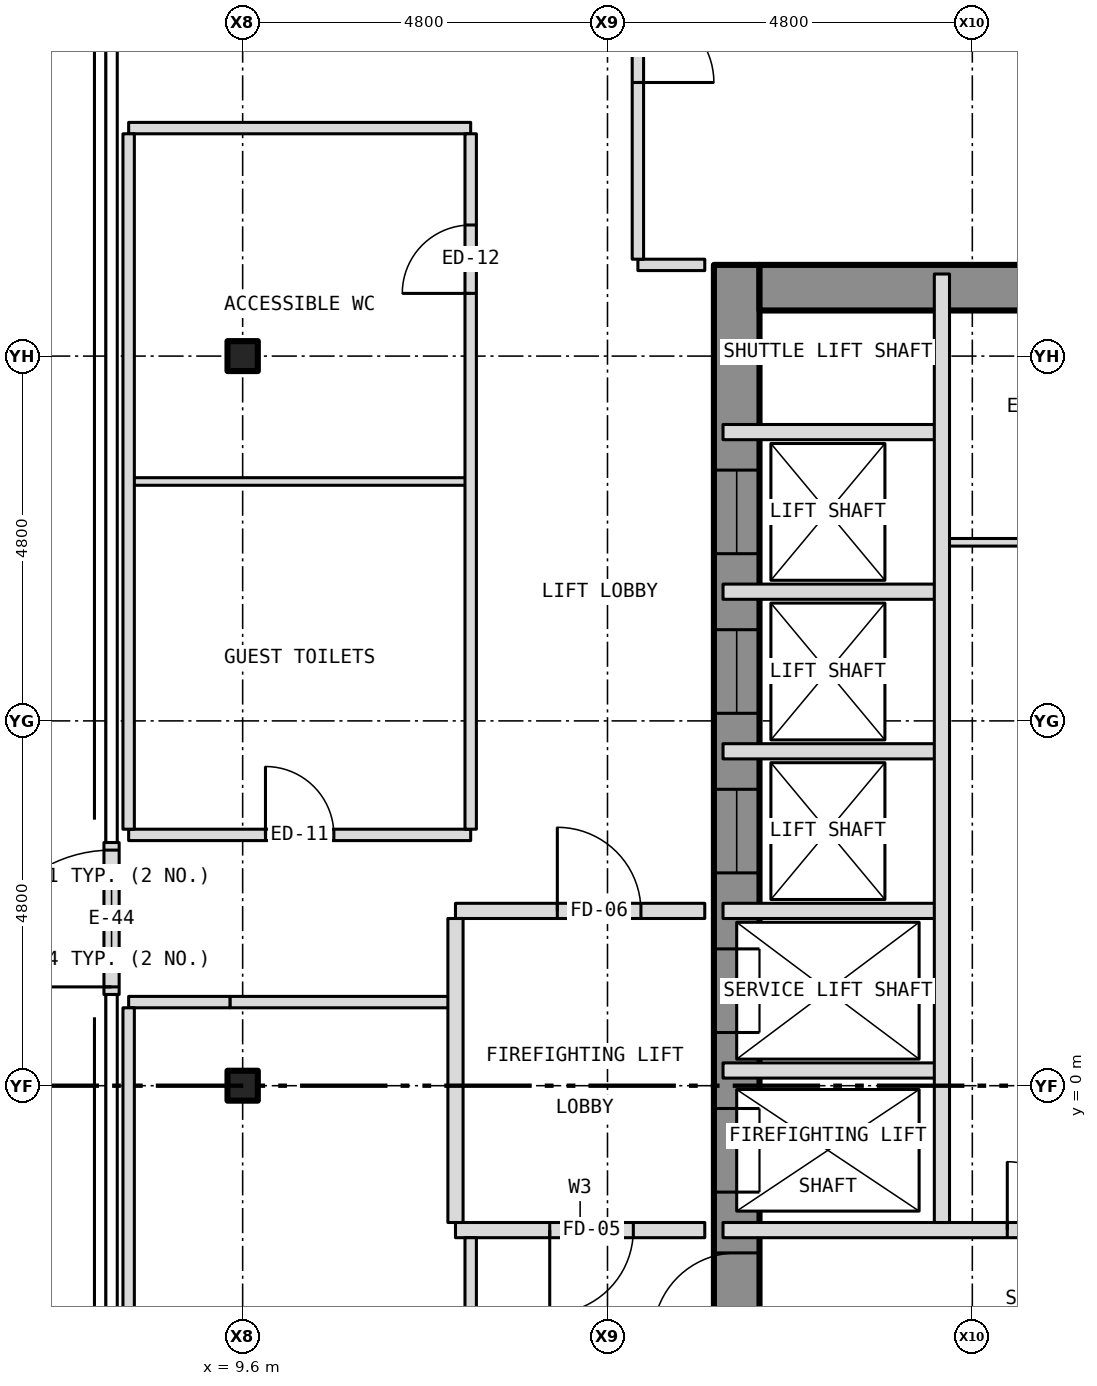
"""IFC4 building model, lengths in metres.
Left out: names, types, materials, properties, quantities, classifications, styles, units other than length and angle.
Written with IfcOpenShell. Run it as: python <this file> out.ifc"""

import sys

from ifc_helpers import new_model, si_unit, direction, frame, frame_2d, origin, origin_2d, place, context, subcontext, project, spatial, rectangle, i_section, extrude, element, fill, save


model = new_model("IFC4")
c1 = context("Model", 3, precision=1e-05, world=origin(), true_north=direction((0.0, 1.0)))
c2 = subcontext(c1, "Body", "Model", "MODEL_VIEW")
j1 = project(units=[si_unit("LENGTHUNIT", "METRE"), si_unit("PLANEANGLEUNIT", "RADIAN")], contexts=[c1])
p1 = place(None, origin())
s1 = spatial("IfcSite", under=j1, at=p1, CompositionType="ELEMENT")
p2 = place(p1, origin())
s2 = spatial("IfcBuilding", under=s1, at=p2, CompositionType="ELEMENT")
p3 = place(p2, frame((0.0, 0.0, 117.0)))
s3 = spatial("IfcBuildingStorey", under=s2, at=p3, CompositionType="ELEMENT", Elevation=117.0)
for number, where, z_axis, x_axis in (
    (1, (9.6, 0.0, -0.15), (0.0, 0.0, 1.0), (1.0, 0.0, 0.0)),
    (2, (9.6, 9.6, -0.15), (0.0, 0.0, 1.0), (1.0, 0.0, 0.0)),
):
    element("IfcColumn", number, at=place(p3, frame(where, z_axis=z_axis, x_axis=x_axis)), inside=s3, PredefinedType="COLUMN", context=c2, shape_type="SweptSolid", body=[
        extrude(i_section(OverallWidth=0.399, OverallDepth=0.394, WebThickness=0.023, FlangeThickness=0.037, at=origin_2d()), origin(), (0.0, 0.0, 1.0), 3.5),
    ])
p4 = place(p3, frame((16.1, -10.8, 0.0), z_axis=(0.0, 0.0, 1.0), x_axis=(0.0, 1.0, 0.0)))
e3 = element("IfcWall", 3, at=p4, inside=s3, PredefinedType="SHEAR", context=c2, shape_type="SweptSolid", body=[
    extrude(rectangle(XDim=21.6, YDim=0.6, at=frame_2d((10.8, 0.0))), origin(), (0.0, 0.0, 1.0), 3.25),
])
p5 = place(p4, frame((9.4, 0.0, 0.0)))
e4 = element("IfcOpeningElement", 4, at=p5, cuts=e3, PredefinedType="OPENING", context=c2, shape_type="SweptSolid", body=[
    extrude(rectangle(XDim=1.1, YDim=2.1, at=frame_2d((0.55, 1.05))), frame((0.0, 0.312, 0.0), z_axis=(0.0, -1.0, 0.0), x_axis=(1.0, 0.0, 0.0)), (0.0, 0.0, 1.0), 0.624),
])
p6 = place(p4, frame((11.5, 0.0, 0.0)))
e5 = element("IfcOpeningElement", 5, at=p6, cuts=e3, PredefinedType="OPENING", context=c2, shape_type="SweptSolid", body=[
    extrude(rectangle(XDim=1.1, YDim=2.1, at=frame_2d((0.55, 1.05))), frame((0.0, 0.312, 0.0), z_axis=(0.0, -1.0, 0.0), x_axis=(1.0, 0.0, 0.0)), (0.0, 0.0, 1.0), 0.624),
])
p7 = place(p4, frame((13.6, 0.0, 0.0)))
e6 = element("IfcOpeningElement", 6, at=p7, cuts=e3, PredefinedType="OPENING", context=c2, shape_type="SweptSolid", body=[
    extrude(rectangle(XDim=1.1, YDim=2.1, at=frame_2d((0.55, 1.05))), frame((0.0, 0.312, 0.0), z_axis=(0.0, -1.0, 0.0), x_axis=(1.0, 0.0, 0.0)), (0.0, 0.0, 1.0), 0.624),
])
p8 = place(p4, frame((15.7, 0.0, 0.0)))
e7 = element("IfcOpeningElement", 7, at=p8, cuts=e3, PredefinedType="OPENING", context=c2, shape_type="SweptSolid", body=[
    extrude(rectangle(XDim=1.1, YDim=2.1, at=frame_2d((0.55, 1.05))), frame((0.0, 0.312, 0.0), z_axis=(0.0, -1.0, 0.0), x_axis=(1.0, 0.0, 0.0)), (0.0, 0.0, 1.0), 0.624),
])
p9 = place(p4, frame((17.8, 0.0, 0.0)))
e8 = element("IfcOpeningElement", 8, at=p9, cuts=e3, PredefinedType="OPENING", context=c2, shape_type="SweptSolid", body=[
    extrude(rectangle(XDim=1.1, YDim=2.1, at=frame_2d((0.55, 1.05))), frame((0.0, 0.312, 0.0), z_axis=(0.0, -1.0, 0.0), x_axis=(1.0, 0.0, 0.0)), (0.0, 0.0, 1.0), 0.624),
])
p10 = place(p4, frame((5.642, 0.0, 0.0)))
e9 = element("IfcOpeningElement", 9, at=p10, cuts=e3, PredefinedType="OPENING", context=c2, shape_type="SweptSolid", body=[
    extrude(rectangle(XDim=1.1, YDim=2.1, at=frame_2d((0.55, 1.05))), frame((0.0, 0.312, 0.0), z_axis=(0.0, -1.0, 0.0), x_axis=(1.0, 0.0, 0.0)), (0.0, 0.0, 1.0), 0.624),
])
p11 = place(p4, frame((7.5, 0.0, 0.0)))
e10 = element("IfcOpeningElement", 10, at=p11, cuts=e3, PredefinedType="OPENING", context=c2, shape_type="SweptSolid", body=[
    extrude(rectangle(XDim=1.1, YDim=2.1, at=frame_2d((0.55, 1.05))), frame((0.0, 0.312, 0.0), z_axis=(0.0, -1.0, 0.0), x_axis=(1.0, 0.0, 0.0)), (0.0, 0.0, 1.0), 0.624),
])
p12 = place(p3, frame((16.4, 10.5, 0.0), z_axis=(0.0, 0.0, 1.0), x_axis=(1.0, 0.0, 0.0)))
e11 = element("IfcWall", 11, at=p12, inside=s3, PredefinedType="SHEAR", context=c2, shape_type="SweptSolid", body=[
    extrude(rectangle(XDim=5.8, YDim=0.6, at=frame_2d((2.9, 0.0))), origin(), (0.0, 0.0, 1.0), 3.25),
])
p13 = place(p3, frame((7.875, 1.2, 0.0), z_axis=(0.0, 0.0, 1.0), x_axis=(0.0, 1.0, 0.0)))
e12 = element("IfcWall", 12, at=p13, inside=s3, PredefinedType="SOLIDWALL", context=c2, shape_type="SweptSolid", body=[
    extrude(rectangle(XDim=2.0, YDim=0.2, at=frame_2d((1.0, 0.0))), origin(), (0.0, 0.0, 1.0), 2.593),
])
p14 = place(p13, frame((0.1, 0.0, 0.0)))
e13 = element("IfcOpeningElement", 13, at=p14, cuts=e12, PredefinedType="OPENING", context=c2, shape_type="SweptSolid", body=[
    extrude(rectangle(XDim=1.8, YDim=2.1, at=frame_2d((0.9, 1.05))), frame((0.0, 0.112, 0.0), z_axis=(0.0, -1.0, 0.0), x_axis=(1.0, 0.0, 0.0)), (0.0, 0.0, 1.0), 0.224),
])
p15 = place(p3, frame((12.4, -1.9, 0.0), z_axis=(0.0, 0.0, 1.0), x_axis=(1.0, 0.0, 0.0)))
e14 = element("IfcWall", 14, at=p15, inside=s3, PredefinedType="PARTITIONING", context=c2, shape_type="SweptSolid", body=[
    extrude(rectangle(XDim=3.28, YDim=0.2, at=frame_2d((1.64, 0.0))), origin(), (0.0, 0.0, 1.0), 3.35),
])
p16 = place(p15, frame((1.24, 0.0, 0.0)))
e15 = element("IfcOpeningElement", 15, at=p16, cuts=e14, PredefinedType="OPENING", context=c2, shape_type="SweptSolid", body=[
    extrude(rectangle(XDim=1.1, YDim=2.1, at=frame_2d((0.55, 1.05))), frame((0.0, 0.112, 0.0), z_axis=(0.0, -1.0, 0.0), x_axis=(1.0, 0.0, 0.0)), (0.0, 0.0, 1.0), 0.224),
])
p17 = place(p3, frame((15.92, -1.9, 0.0), z_axis=(0.0, 0.0, 1.0), x_axis=(1.0, 0.0, 0.0)))
e16 = element("IfcWall", 16, at=p17, inside=s3, PredefinedType="PARTITIONING", context=c2, shape_type="SweptSolid", body=[
    extrude(rectangle(XDim=6.76, YDim=0.2, at=frame_2d((3.38, 0.0))), origin(), (0.0, 0.0, 1.0), 3.25),
])
p18 = place(p17, frame((3.74, 0.0, 0.0)))
e17 = element("IfcOpeningElement", 17, at=p18, cuts=e16, PredefinedType="OPENING", context=c2, shape_type="SweptSolid", body=[
    extrude(rectangle(XDim=0.9, YDim=2.1, at=frame_2d((0.45, 1.05))), frame((0.0, 0.112, 0.0), z_axis=(0.0, -1.0, 0.0), x_axis=(1.0, 0.0, 0.0)), (0.0, 0.0, 1.0), 0.224),
])
p19 = place(p3, frame((15.92, 0.2, 0.0), z_axis=(0.0, 0.0, 1.0), x_axis=(1.0, 0.0, 0.0)))
e18 = element("IfcWall", 18, at=p19, inside=s3, PredefinedType="PARTITIONING", context=c2, shape_type="SweptSolid", body=[
    extrude(rectangle(XDim=2.88, YDim=0.2, at=frame_2d((1.44, 0.0))), origin(), (0.0, 0.0, 1.0), 3.25),
])
p20 = place(p3, frame((8.1, 1.1, 0.0), z_axis=(0.0, 0.0, 1.0), x_axis=(1.0, 0.0, 0.0)))
e19 = element("IfcWall", 19, at=p20, inside=s3, PredefinedType="PARTITIONING", context=c2, shape_type="SweptSolid", body=[
    extrude(rectangle(XDim=1.336, YDim=0.15, at=frame_2d((0.668, 0.0))), origin(), (0.0, 0.0, 1.0), 2.593),
])
p21 = place(p3, frame((9.436, 1.1, 0.0), z_axis=(0.0, 0.0, 1.0), x_axis=(1.0, 0.0, 0.0)))
e20 = element("IfcWall", 20, at=p21, inside=s3, PredefinedType="PARTITIONING", context=c2, shape_type="SweptSolid", body=[
    extrude(rectangle(XDim=2.964, YDim=0.15, at=frame_2d((1.482, 0.0))), origin(), (0.0, 0.0, 1.0), 3.35),
])
p22 = place(p3, frame((12.4, 2.3, 0.0), z_axis=(0.0, 0.0, 1.0), x_axis=(1.0, 0.0, 0.0)))
e21 = element("IfcWall", 21, at=p22, inside=s3, PredefinedType="PARTITIONING", context=c2, shape_type="SweptSolid", body=[
    extrude(rectangle(XDim=3.28, YDim=0.2, at=frame_2d((1.64, 0.0))), origin(), (0.0, 0.0, 1.0), 3.35),
])
p23 = place(p22, frame((1.34, 0.0, 0.0)))
e22 = element("IfcOpeningElement", 22, at=p23, cuts=e21, PredefinedType="OPENING", context=c2, shape_type="SweptSolid", body=[
    extrude(rectangle(XDim=1.1, YDim=2.1, at=frame_2d((0.55, 1.05))), frame((0.0, 0.112, 0.0), z_axis=(0.0, -1.0, 0.0), x_axis=(1.0, 0.0, 0.0)), (0.0, 0.0, 1.0), 0.224),
])
p24 = place(p3, frame((15.92, 2.3, 0.0), z_axis=(0.0, 0.0, 1.0), x_axis=(1.0, 0.0, 0.0)))
e23 = element("IfcWall", 23, at=p24, inside=s3, PredefinedType="PARTITIONING", context=c2, shape_type="SweptSolid", body=[
    extrude(rectangle(XDim=2.88, YDim=0.2, at=frame_2d((1.44, 0.0))), origin(), (0.0, 0.0, 1.0), 3.25),
])
p25 = place(p3, frame((8.1, 3.3, 0.0), z_axis=(0.0, 0.0, 1.0), x_axis=(1.0, 0.0, 0.0)))
e24 = element("IfcWall", 24, at=p25, inside=s3, PredefinedType="PARTITIONING", context=c2, shape_type="SweptSolid", body=[
    extrude(rectangle(XDim=4.5, YDim=0.15, at=frame_2d((2.25, 0.0))), origin(), (0.0, 0.0, 1.0), 3.35),
])
p26 = place(p25, frame((1.8, 0.0, 0.0)))
e25 = element("IfcOpeningElement", 25, at=p26, cuts=e24, PredefinedType="OPENING", context=c2, shape_type="SweptSolid", body=[
    extrude(rectangle(XDim=0.9, YDim=2.1, at=frame_2d((0.45, 1.05))), frame((0.0, 0.087, 0.0), z_axis=(0.0, -1.0, 0.0), x_axis=(1.0, 0.0, 0.0)), (0.0, 0.0, 1.0), 0.174),
])
for number, where, z_axis, x_axis in (
    (26, (15.92, 4.4, 0.0), (0.0, 0.0, 1.0), (1.0, 0.0, 0.0)),
    (27, (15.92, 6.5, 0.0), (0.0, 0.0, 1.0), (1.0, 0.0, 0.0)),
):
    element("IfcWall", number, at=place(p3, frame(where, z_axis=z_axis, x_axis=x_axis)), inside=s3, PredefinedType="PARTITIONING", context=c2, shape_type="SweptSolid", body=[
        extrude(rectangle(XDim=2.88, YDim=0.2, at=frame_2d((1.44, 0.0))), origin(), (0.0, 0.0, 1.0), 3.25),
    ])
p27 = place(p3, frame((18.8, 7.15, 0.0), z_axis=(0.0, 0.0, 1.0), x_axis=(1.0, 0.0, 0.0)))
e28 = element("IfcWall", 28, at=p27, inside=s3, PredefinedType="PARTITIONING", context=c2, shape_type="SweptSolid", body=[
    extrude(rectangle(XDim=3.88, YDim=0.1, at=frame_2d((1.94, 0.0))), origin(), (0.0, 0.0, 1.0), 3.25),
])
p28 = place(p27, frame((1.55, 0.0, 0.0)))
e29 = element("IfcOpeningElement", 29, at=p28, cuts=e28, PredefinedType="OPENING", context=c2, shape_type="SweptSolid", body=[
    extrude(rectangle(XDim=0.9, YDim=2.1, at=frame_2d((0.45, 1.05))), frame((0.0, 0.062, 0.0), z_axis=(0.0, -1.0, 0.0), x_axis=(1.0, 0.0, 0.0)), (0.0, 0.0, 1.0), 0.124),
])
p29 = place(p3, frame((8.1, 7.95, 0.0), z_axis=(0.0, 0.0, 1.0), x_axis=(1.0, 0.0, 0.0)))
e30 = element("IfcWall", 30, at=p29, inside=s3, PredefinedType="PARTITIONING", context=c2, shape_type="SweptSolid", body=[
    extrude(rectangle(XDim=4.5, YDim=0.1, at=frame_2d((2.25, 0.0))), origin(), (0.0, 0.0, 1.0), 3.35),
])
p30 = place(p3, frame((15.92, 8.6, 0.0), z_axis=(0.0, 0.0, 1.0), x_axis=(1.0, 0.0, 0.0)))
e31 = element("IfcWall", 31, at=p30, inside=s3, PredefinedType="PARTITIONING", context=c2, shape_type="SweptSolid", body=[
    extrude(rectangle(XDim=2.88, YDim=0.2, at=frame_2d((1.44, 0.0))), origin(), (0.0, 0.0, 1.0), 3.25),
])
p31 = place(p3, frame((14.8, 10.8, 0.0), z_axis=(0.0, 0.0, 1.0), x_axis=(1.0, 0.0, 0.0)))
e32 = element("IfcWall", 32, at=p31, inside=s3, PredefinedType="PARTITIONING", context=c2, shape_type="SweptSolid", body=[
    extrude(rectangle(XDim=0.88, YDim=0.15, at=frame_2d((0.44, 0.0))), origin(), (0.0, 0.0, 1.0), 3.35),
])
p32 = place(p3, frame((8.1, 12.6, 0.0), z_axis=(0.0, 0.0, 1.0), x_axis=(1.0, 0.0, 0.0)))
e33 = element("IfcWall", 33, at=p32, inside=s3, PredefinedType="PARTITIONING", context=c2, shape_type="SweptSolid", body=[
    extrude(rectangle(XDim=4.5, YDim=0.15, at=frame_2d((2.25, 0.0))), origin(), (0.0, 0.0, 1.0), 3.35),
])
p33 = place(p3, frame((8.1, -12.525, 0.0), z_axis=(0.0, 0.0, 1.0), x_axis=(0.0, 1.0, 0.0)))
e34 = element("IfcWall", 34, at=p33, inside=s3, PredefinedType="PARTITIONING", context=c2, shape_type="SweptSolid", body=[
    extrude(rectangle(XDim=13.55, YDim=0.15, at=frame_2d((6.775, 0.0))), origin(), (0.0, 0.0, 1.0), 3.35),
])
p34 = place(p3, frame((8.1, 3.375, 0.0), z_axis=(0.0, 0.0, 1.0), x_axis=(0.0, 1.0, 0.0)))
e35 = element("IfcWall", 35, at=p34, inside=s3, PredefinedType="PARTITIONING", context=c2, shape_type="SweptSolid", body=[
    extrude(rectangle(XDim=9.15, YDim=0.15, at=frame_2d((4.575, 0.0))), origin(), (0.0, 0.0, 1.0), 3.35),
])
p35 = place(p3, frame((12.4, -1.8, 0.0), z_axis=(0.0, 0.0, 1.0), x_axis=(0.0, 1.0, 0.0)))
e36 = element("IfcWall", 36, at=p35, inside=s3, PredefinedType="PARTITIONING", context=c2, shape_type="SweptSolid", body=[
    extrude(rectangle(XDim=4.0, YDim=0.2, at=frame_2d((2.0, 0.0))), origin(), (0.0, 0.0, 1.0), 3.35),
])
p36 = place(p3, frame((12.6, -12.525, 0.0), z_axis=(0.0, 0.0, 1.0), x_axis=(0.0, 1.0, 0.0)))
e37 = element("IfcWall", 37, at=p36, inside=s3, PredefinedType="PARTITIONING", context=c2, shape_type="SweptSolid", body=[
    extrude(rectangle(XDim=10.525, YDim=0.15, at=frame_2d((5.262, 0.0))), origin(), (0.0, 0.0, 1.0), 3.35),
])
p37 = place(p36, frame((4.825, 0.0, 0.0)))
e38 = element("IfcOpeningElement", 38, at=p37, cuts=e37, PredefinedType="OPENING", context=c2, shape_type="SweptSolid", body=[
    extrude(rectangle(XDim=0.9, YDim=2.1, at=frame_2d((0.45, 1.05))), frame((0.0, 0.087, 0.0), z_axis=(0.0, -1.0, 0.0), x_axis=(1.0, 0.0, 0.0)), (0.0, 0.0, 1.0), 0.174),
])
p38 = place(p3, frame((12.6, 3.375, 0.0), z_axis=(0.0, 0.0, 1.0), x_axis=(0.0, 1.0, 0.0)))
e39 = element("IfcWall", 39, at=p38, inside=s3, PredefinedType="PARTITIONING", context=c2, shape_type="SweptSolid", body=[
    extrude(rectangle(XDim=9.15, YDim=0.15, at=frame_2d((4.575, 0.0))), origin(), (0.0, 0.0, 1.0), 3.35),
])
p39 = place(p38, frame((7.05, 0.0, 0.0)))
e40 = element("IfcOpeningElement", 40, at=p39, cuts=e39, PredefinedType="OPENING", context=c2, shape_type="SweptSolid", body=[
    extrude(rectangle(XDim=0.9, YDim=2.1, at=frame_2d((0.45, 1.05))), frame((0.0, 0.087, 0.0), z_axis=(0.0, -1.0, 0.0), x_axis=(1.0, 0.0, 0.0)), (0.0, 0.0, 1.0), 0.174),
])
p40 = place(p3, frame((14.8, 10.875, 0.0), z_axis=(0.0, 0.0, 1.0), x_axis=(0.0, 1.0, 0.0)))
e41 = element("IfcWall", 41, at=p40, inside=s3, PredefinedType="PARTITIONING", context=c2, shape_type="SweptSolid", body=[
    extrude(rectangle(XDim=3.85, YDim=0.15, at=frame_2d((1.925, 0.0))), origin(), (0.0, 0.0, 1.0), 3.35),
])
p41 = place(p40, frame((2.325, 0.0, 0.0)))
e42 = element("IfcOpeningElement", 42, at=p41, cuts=e41, PredefinedType="OPENING", context=c2, shape_type="SweptSolid", body=[
    extrude(rectangle(XDim=1.0, YDim=2.1, at=frame_2d((0.5, 1.05))), frame((0.0, 0.087, 0.0), z_axis=(0.0, -1.0, 0.0), x_axis=(1.0, 0.0, 0.0)), (0.0, 0.0, 1.0), 0.174),
])
p42 = place(p3, frame((18.8, -1.8, 0.0), z_axis=(0.0, 0.0, 1.0), x_axis=(0.0, 1.0, 0.0)))
e43 = element("IfcWall", 43, at=p42, inside=s3, PredefinedType="PARTITIONING", context=c2, shape_type="SweptSolid", body=[
    extrude(rectangle(XDim=12.48, YDim=0.2, at=frame_2d((6.24, 0.0))), origin(), (0.0, 0.0, 1.0), 3.25),
])
p43 = place(p14, origin())
e44 = element("IfcDoor", 44, at=p43, inside=s3, OperationType="DOUBLE_DOOR_DOUBLE_SWING", PredefinedType="DOOR", context=c2, shape_type="SweptSolid", body=[
    extrude(rectangle(XDim=1.8, YDim=2.1, at=frame_2d((0.9, 1.05))), frame((0.0, 0.025, 0.0), z_axis=(0.0, -1.0, 0.0), x_axis=(1.0, 0.0, 0.0)), (0.0, 0.0, 1.0), 0.05),
])
fill(e13, e44)
p44 = place(p5, origin())
e45 = element("IfcDoor", 45, at=p44, inside=s3, OperationType="SLIDING_TO_LEFT", PredefinedType="DOOR", context=c2, shape_type="SweptSolid", body=[
    extrude(rectangle(XDim=1.1, YDim=2.1, at=frame_2d((0.55, 1.05))), frame((0.0, 0.025, 0.0), z_axis=(0.0, -1.0, 0.0), x_axis=(1.0, 0.0, 0.0)), (0.0, 0.0, 1.0), 0.05),
])
fill(e4, e45)
p45 = place(p6, origin())
e46 = element("IfcDoor", 46, at=p45, inside=s3, OperationType="SLIDING_TO_LEFT", PredefinedType="DOOR", context=c2, shape_type="SweptSolid", body=[
    extrude(rectangle(XDim=1.1, YDim=2.1, at=frame_2d((0.55, 1.05))), frame((0.0, 0.025, 0.0), z_axis=(0.0, -1.0, 0.0), x_axis=(1.0, 0.0, 0.0)), (0.0, 0.0, 1.0), 0.05),
])
fill(e5, e46)
p46 = place(p7, origin())
e47 = element("IfcDoor", 47, at=p46, inside=s3, OperationType="SLIDING_TO_LEFT", PredefinedType="DOOR", context=c2, shape_type="SweptSolid", body=[
    extrude(rectangle(XDim=1.1, YDim=2.1, at=frame_2d((0.55, 1.05))), frame((0.0, 0.025, 0.0), z_axis=(0.0, -1.0, 0.0), x_axis=(1.0, 0.0, 0.0)), (0.0, 0.0, 1.0), 0.05),
])
fill(e6, e47)
p47 = place(p8, origin())
e48 = element("IfcDoor", 48, at=p47, inside=s3, OperationType="SLIDING_TO_LEFT", PredefinedType="DOOR", context=c2, shape_type="SweptSolid", body=[
    extrude(rectangle(XDim=1.1, YDim=2.1, at=frame_2d((0.55, 1.05))), frame((0.0, 0.025, 0.0), z_axis=(0.0, -1.0, 0.0), x_axis=(1.0, 0.0, 0.0)), (0.0, 0.0, 1.0), 0.05),
])
fill(e7, e48)
p48 = place(p9, origin())
e49 = element("IfcDoor", 49, at=p48, inside=s3, OperationType="SLIDING_TO_LEFT", PredefinedType="DOOR", context=c2, shape_type="SweptSolid", body=[
    extrude(rectangle(XDim=1.1, YDim=2.1, at=frame_2d((0.55, 1.05))), frame((0.0, 0.025, 0.0), z_axis=(0.0, -1.0, 0.0), x_axis=(1.0, 0.0, 0.0)), (0.0, 0.0, 1.0), 0.05),
])
fill(e8, e49)
p49 = place(p11, origin())
e50 = element("IfcDoor", 50, at=p49, inside=s3, OperationType="SINGLE_SWING_LEFT", PredefinedType="DOOR", context=c2, shape_type="SweptSolid", body=[
    extrude(rectangle(XDim=1.1, YDim=2.1, at=frame_2d((0.55, 1.05))), frame((0.0, 0.025, 0.0), z_axis=(0.0, -1.0, 0.0), x_axis=(1.0, 0.0, 0.0)), (0.0, 0.0, 1.0), 0.05),
])
fill(e10, e50)
p50 = place(p18, origin())
e51 = element("IfcDoor", 51, at=p50, inside=s3, OperationType="SINGLE_SWING_LEFT", PredefinedType="DOOR", context=c2, shape_type="SweptSolid", body=[
    extrude(rectangle(XDim=0.9, YDim=2.1, at=frame_2d((0.45, 1.05))), frame((0.0, 0.025, 0.0), z_axis=(0.0, -1.0, 0.0), x_axis=(1.0, 0.0, 0.0)), (0.0, 0.0, 1.0), 0.05),
])
fill(e17, e51)
p51 = place(p16, origin())
e52 = element("IfcDoor", 52, at=p51, inside=s3, OperationType="SINGLE_SWING_LEFT", PredefinedType="DOOR", context=c2, shape_type="SweptSolid", body=[
    extrude(rectangle(XDim=1.1, YDim=2.1, at=frame_2d((0.55, 1.05))), frame((0.0, 0.025, 0.0), z_axis=(0.0, -1.0, 0.0), x_axis=(1.0, 0.0, 0.0)), (0.0, 0.0, 1.0), 0.05),
])
fill(e15, e52)
p52 = place(p23, origin())
e53 = element("IfcDoor", 53, at=p52, inside=s3, OperationType="SINGLE_SWING_LEFT", PredefinedType="DOOR", context=c2, shape_type="SweptSolid", body=[
    extrude(rectangle(XDim=1.1, YDim=2.1, at=frame_2d((0.55, 1.05))), frame((0.0, 0.025, 0.0), z_axis=(0.0, -1.0, 0.0), x_axis=(1.0, 0.0, 0.0)), (0.0, 0.0, 1.0), 0.05),
])
fill(e22, e53)
p53 = place(p41, origin())
e54 = element("IfcDoor", 54, at=p53, inside=s3, OperationType="SINGLE_SWING_LEFT", PredefinedType="DOOR", context=c2, shape_type="SweptSolid", body=[
    extrude(rectangle(XDim=1.0, YDim=2.1, at=frame_2d((0.5, 1.05))), frame((0.0, 0.025, 0.0), z_axis=(0.0, -1.0, 0.0), x_axis=(1.0, 0.0, 0.0)), (0.0, 0.0, 1.0), 0.05),
])
fill(e42, e54)
p54 = place(p26, origin())
e55 = element("IfcDoor", 55, at=p54, inside=s3, OperationType="SINGLE_SWING_LEFT", PredefinedType="DOOR", context=c2, shape_type="SweptSolid", body=[
    extrude(rectangle(XDim=0.9, YDim=2.1, at=frame_2d((0.45, 1.05))), frame((0.0, 0.025, 0.0), z_axis=(0.0, -1.0, 0.0), x_axis=(1.0, 0.0, 0.0)), (0.0, 0.0, 1.0), 0.05),
])
fill(e25, e55)
p55 = place(p39, origin())
e56 = element("IfcDoor", 56, at=p55, inside=s3, OperationType="SINGLE_SWING_LEFT", PredefinedType="DOOR", context=c2, shape_type="SweptSolid", body=[
    extrude(rectangle(XDim=0.9, YDim=2.1, at=frame_2d((0.45, 1.05))), frame((0.0, 0.025, 0.0), z_axis=(0.0, -1.0, 0.0), x_axis=(1.0, 0.0, 0.0)), (0.0, 0.0, 1.0), 0.05),
])
fill(e40, e56)
save(model, sys.argv[1])
